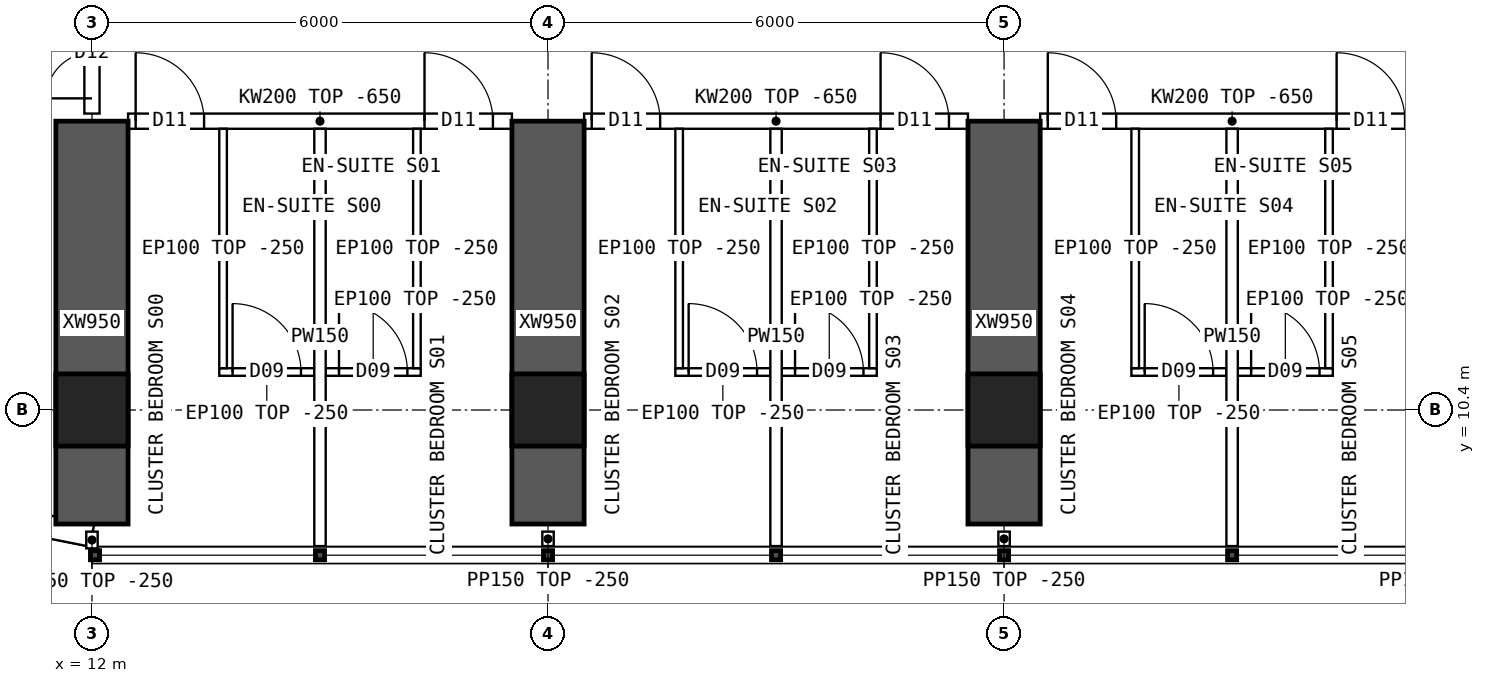
"""IFC4 building model, lengths in metres.
Left out: names, types, materials, properties, quantities, classifications, styles, units other than length and angle.
Written with IfcOpenShell. Run it as: python <this file> out.ifc"""

import sys

from ifc_helpers import new_model, si_unit, direction, frame, frame_2d, origin, origin_2d, place, context, subcontext, project, spatial, polyline, rectangle, hollow_rectangle, outline, extrude, element, fill, save


model = new_model("IFC4")
c1 = context("Model", 3, precision=1e-05, world=origin(), true_north=direction((0.0, 1.0)))
c2 = subcontext(c1, "Body", "Model", "MODEL_VIEW")
j1 = project(units=[si_unit("LENGTHUNIT", "METRE"), si_unit("PLANEANGLEUNIT", "RADIAN")], contexts=[c1])
p1 = place(None, origin())
s1 = spatial("IfcSite", under=j1, at=p1, CompositionType="ELEMENT")
p2 = place(p1, origin())
s2 = spatial("IfcBuilding", under=s1, at=p2, CompositionType="ELEMENT")
p3 = place(p2, frame((0.0, 0.0, 118.15)))
s3 = spatial("IfcBuildingStorey", under=s2, at=p3, CompositionType="ELEMENT", Elevation=118.15)
for number, where, z_axis, x_axis in (
    (1, (12.0, 10.4, 0.0), (0.0, 0.0, 1.0), (1.0, 0.0, 0.0)),
    (2, (18.0, 10.4, 0.0), (0.0, 0.0, 1.0), (1.0, 0.0, 0.0)),
    (3, (24.0, 10.4, 0.0), (0.0, 0.0, 1.0), (1.0, 0.0, 0.0)),
):
    element("IfcColumn", number, at=place(p3, frame(where, z_axis=z_axis, x_axis=x_axis)), inside=s3, PredefinedType="COLUMN", context=c2, shape_type="SweptSolid", body=[
        extrude(hollow_rectangle(XDim=0.95, YDim=0.95, WallThickness=0.095, at=origin_2d()), origin(), (0.0, 0.0, 1.0), 3.75),
    ])
for number, where, z_axis, x_axis in (
    (4, (12.0, 8.9, 0.0), (0.0, 0.0, 1.0), (0.0, 1.0, 0.0)),
    (5, (18.0, 8.9, 0.0), (0.0, 0.0, 1.0), (0.0, 1.0, 0.0)),
    (6, (24.0, 8.9, 0.0), (0.0, 0.0, 1.0), (0.0, 1.0, 0.0)),
):
    element("IfcWall", number, at=place(p3, frame(where, z_axis=z_axis, x_axis=x_axis)), inside=s3, PredefinedType="SHEAR", context=c2, shape_type="SweptSolid", body=[
        extrude(rectangle(XDim=5.3, YDim=0.95, at=frame_2d((2.65, 0.0))), origin(), (0.0, 0.0, 1.0), 3.75),
    ])
p4 = place(p3, frame((8.843, 9.378, 0.0), z_axis=(0.0, 0.0, 1.0), x_axis=(0.980787251524, -0.195080412259, 0.0)))
e7 = element("IfcWall", 7, at=p4, inside=s3, PredefinedType="SOLIDWALL", context=c2, shape_type="SweptSolid", body=[
    extrude(outline(polyline([(-0.03, -0.15), (3.249, -0.15), (3.189, 0.15), (0.03, 0.15), (-0.03, -0.15)])), origin(), (0.0, 0.0, 1.0), 3.5),
])
p5 = place(p4, frame((0.909, 0.0, 0.9)))
e8 = element("IfcOpeningElement", 8, at=p5, cuts=e7, PredefinedType="OPENING", context=c2, shape_type="SweptSolid", body=[
    extrude(rectangle(XDim=1.4, YDim=1.8, at=frame_2d((0.7, 0.9))), frame((0.0, 0.16, 0.0), z_axis=(0.0, -1.0, 0.0), x_axis=(1.0, 0.0, 0.0)), (0.0, 0.0, 1.0), 0.32),
])
p6 = place(p3, frame((12.475, 14.2, 0.0), z_axis=(0.0, 0.0, 1.0), x_axis=(1.0, 0.0, 0.0)))
e9 = element("IfcWall", 9, at=p6, inside=s3, PredefinedType="SOLIDWALL", context=c2, shape_type="SweptSolid", body=[
    extrude(outline(polyline([(0.0, 0.0), (5.05, 0.0), (5.05, 3.1), (0.0, 3.1), (0.0, 0.0)])), frame((0.0, 0.1, 0.0), z_axis=(0.0, -1.0, 0.0), x_axis=(1.0, 0.0, 0.0)), (0.0, 0.0, 1.0), 0.2),
])
p7 = place(p6, frame((0.1, 0.0, 0.0)))
e10 = element("IfcOpeningElement", 10, at=p7, cuts=e9, PredefinedType="OPENING", context=c2, shape_type="SweptSolid", body=[
    extrude(rectangle(XDim=0.9, YDim=2.1, at=frame_2d((0.45, 1.05))), frame((0.0, 0.11, 0.0), z_axis=(0.0, -1.0, 0.0), x_axis=(1.0, 0.0, 0.0)), (0.0, 0.0, 1.0), 0.22),
])
p8 = place(p6, frame((3.9, 0.0, 0.0)))
e11 = element("IfcOpeningElement", 11, at=p8, cuts=e9, PredefinedType="OPENING", context=c2, shape_type="SweptSolid", body=[
    extrude(rectangle(XDim=0.9, YDim=2.1, at=frame_2d((0.45, 1.05))), frame((0.0, 0.11, 0.0), z_axis=(0.0, -1.0, 0.0), x_axis=(1.0, 0.0, 0.0)), (0.0, 0.0, 1.0), 0.22),
])
p9 = place(p3, frame((18.475, 14.2, 0.0), z_axis=(0.0, 0.0, 1.0), x_axis=(1.0, 0.0, 0.0)))
e12 = element("IfcWall", 12, at=p9, inside=s3, PredefinedType="SOLIDWALL", context=c2, shape_type="SweptSolid", body=[
    extrude(outline(polyline([(0.0, 0.0), (5.05, 0.0), (5.05, 3.1), (0.0, 3.1), (0.0, 0.0)])), frame((0.0, 0.1, 0.0), z_axis=(0.0, -1.0, 0.0), x_axis=(1.0, 0.0, 0.0)), (0.0, 0.0, 1.0), 0.2),
])
p10 = place(p9, frame((0.1, 0.0, 0.0)))
e13 = element("IfcOpeningElement", 13, at=p10, cuts=e12, PredefinedType="OPENING", context=c2, shape_type="SweptSolid", body=[
    extrude(rectangle(XDim=0.9, YDim=2.1, at=frame_2d((0.45, 1.05))), frame((0.0, 0.11, 0.0), z_axis=(0.0, -1.0, 0.0), x_axis=(1.0, 0.0, 0.0)), (0.0, 0.0, 1.0), 0.22),
])
p11 = place(p9, frame((3.9, 0.0, 0.0)))
e14 = element("IfcOpeningElement", 14, at=p11, cuts=e12, PredefinedType="OPENING", context=c2, shape_type="SweptSolid", body=[
    extrude(rectangle(XDim=0.9, YDim=2.1, at=frame_2d((0.45, 1.05))), frame((0.0, 0.11, 0.0), z_axis=(0.0, -1.0, 0.0), x_axis=(1.0, 0.0, 0.0)), (0.0, 0.0, 1.0), 0.22),
])
p12 = place(p3, frame((24.475, 14.2, 0.0), z_axis=(0.0, 0.0, 1.0), x_axis=(1.0, 0.0, 0.0)))
e15 = element("IfcWall", 15, at=p12, inside=s3, PredefinedType="SOLIDWALL", context=c2, shape_type="SweptSolid", body=[
    extrude(outline(polyline([(0.0, 0.0), (5.05, 0.0), (5.05, 3.1), (0.0, 3.1), (0.0, 0.0)])), frame((0.0, 0.1, 0.0), z_axis=(0.0, -1.0, 0.0), x_axis=(1.0, 0.0, 0.0)), (0.0, 0.0, 1.0), 0.2),
])
p13 = place(p12, frame((0.1, 0.0, 0.0)))
e16 = element("IfcOpeningElement", 16, at=p13, cuts=e15, PredefinedType="OPENING", context=c2, shape_type="SweptSolid", body=[
    extrude(rectangle(XDim=0.9, YDim=2.1, at=frame_2d((0.45, 1.05))), frame((0.0, 0.11, 0.0), z_axis=(0.0, -1.0, 0.0), x_axis=(1.0, 0.0, 0.0)), (0.0, 0.0, 1.0), 0.22),
])
p14 = place(p12, frame((3.9, 0.0, 0.0)))
e17 = element("IfcOpeningElement", 17, at=p14, cuts=e15, PredefinedType="OPENING", context=c2, shape_type="SweptSolid", body=[
    extrude(rectangle(XDim=0.9, YDim=2.1, at=frame_2d((0.45, 1.05))), frame((0.0, 0.11, 0.0), z_axis=(0.0, -1.0, 0.0), x_axis=(1.0, 0.0, 0.0)), (0.0, 0.0, 1.0), 0.22),
])
p15 = place(p3, frame((15.0, 8.61, 0.0), z_axis=(0.0, 0.0, 1.0), x_axis=(0.0, 1.0, 0.0)))
e18 = element("IfcWall", 18, at=p15, inside=s3, PredefinedType="PARTITIONING", context=c2, shape_type="SweptSolid", body=[
    extrude(outline(polyline([(0.0, 0.0), (5.49, 0.0), (5.49, 3.1), (5.442, 3.1), (5.44, 3.5), (1.992, 3.5), (1.99, 3.1), (1.592, 3.1), (1.59, 3.5), (0.0, 3.5), (0.0, 0.0)])), frame((0.0, 0.075, 0.0), z_axis=(0.0, -1.0, 0.0), x_axis=(1.0, 0.0, 0.0)), (0.0, 0.0, 1.0), 0.15),
])
p16 = place(p3, frame((14.925, 10.9, 0.0), z_axis=(0.0, 0.0, 1.0), x_axis=(-1.0, 0.0, 0.0)))
e19 = element("IfcWall", 19, at=p16, inside=s3, PredefinedType="PARTITIONING", context=c2, shape_type="SweptSolid", body=[
    extrude(rectangle(XDim=1.25, YDim=0.1, at=frame_2d((0.625, 0.0))), origin(), (0.0, 0.0, 1.0), 3.5),
])
p17 = place(p16, frame((0.175, 0.0, 0.0)))
e20 = element("IfcOpeningElement", 20, at=p17, cuts=e19, PredefinedType="OPENING", context=c2, shape_type="SweptSolid", body=[
    extrude(rectangle(XDim=0.9, YDim=2.1, at=frame_2d((0.45, 1.05))), frame((0.0, 0.06, 0.0), z_axis=(0.0, -1.0, 0.0), x_axis=(1.0, 0.0, 0.0)), (0.0, 0.0, 1.0), 0.12),
])
p18 = place(p3, frame((13.725, 10.95, 0.0), z_axis=(0.0, 0.0, 1.0), x_axis=(0.0, 1.0, 0.0)))
e21 = element("IfcWall", 21, at=p18, inside=s3, PredefinedType="PARTITIONING", context=c2, shape_type="SweptSolid", body=[
    extrude(outline(polyline([(0.0, 0.0), (3.15, 0.0), (3.15, 3.1), (3.102, 3.1), (3.1, 3.5), (0.0, 3.5), (0.0, 0.0)])), frame((0.0, 0.05, 0.0), z_axis=(0.0, -1.0, 0.0), x_axis=(1.0, 0.0, 0.0)), (0.0, 0.0, 1.0), 0.1),
])
p19 = place(p3, frame((16.325, 10.9, 0.0), z_axis=(0.0, 0.0, 1.0), x_axis=(-1.0, 0.0, 0.0)))
e22 = element("IfcWall", 22, at=p19, inside=s3, PredefinedType="PARTITIONING", context=c2, shape_type="SweptSolid", body=[
    extrude(rectangle(XDim=1.25, YDim=0.1, at=frame_2d((0.625, 0.0))), origin(), (0.0, 0.0, 1.0), 3.5),
])
p20 = place(p19, frame((0.175, 0.0, 0.0)))
e23 = element("IfcOpeningElement", 23, at=p20, cuts=e22, PredefinedType="OPENING", context=c2, shape_type="SweptSolid", body=[
    extrude(rectangle(XDim=0.9, YDim=2.1, at=frame_2d((0.45, 1.05))), frame((0.0, 0.06, 0.0), z_axis=(0.0, -1.0, 0.0), x_axis=(1.0, 0.0, 0.0)), (0.0, 0.0, 1.0), 0.12),
])
p21 = place(p3, frame((16.275, 10.95, 0.0), z_axis=(0.0, 0.0, 1.0), x_axis=(0.0, 1.0, 0.0)))
e24 = element("IfcWall", 24, at=p21, inside=s3, PredefinedType="PARTITIONING", context=c2, shape_type="SweptSolid", body=[
    extrude(outline(polyline([(0.0, 0.0), (3.15, 0.0), (3.15, 3.1), (3.102, 3.1), (3.1, 3.5), (0.0, 3.5), (0.0, 0.0)])), frame((0.0, 0.05, 0.0), z_axis=(0.0, -1.0, 0.0), x_axis=(1.0, 0.0, 0.0)), (0.0, 0.0, 1.0), 0.1),
])
p22 = place(p3, frame((21.0, 8.61, 0.0), z_axis=(0.0, 0.0, 1.0), x_axis=(0.0, 1.0, 0.0)))
e25 = element("IfcWall", 25, at=p22, inside=s3, PredefinedType="PARTITIONING", context=c2, shape_type="SweptSolid", body=[
    extrude(outline(polyline([(0.0, 0.0), (5.49, 0.0), (5.49, 3.1), (5.442, 3.1), (5.44, 3.5), (1.992, 3.5), (1.99, 3.1), (1.592, 3.1), (1.59, 3.5), (0.0, 3.5), (0.0, 0.0)])), frame((0.0, 0.075, 0.0), z_axis=(0.0, -1.0, 0.0), x_axis=(1.0, 0.0, 0.0)), (0.0, 0.0, 1.0), 0.15),
])
p23 = place(p3, frame((20.925, 10.9, 0.0), z_axis=(0.0, 0.0, 1.0), x_axis=(-1.0, 0.0, 0.0)))
e26 = element("IfcWall", 26, at=p23, inside=s3, PredefinedType="PARTITIONING", context=c2, shape_type="SweptSolid", body=[
    extrude(rectangle(XDim=1.25, YDim=0.1, at=frame_2d((0.625, 0.0))), origin(), (0.0, 0.0, 1.0), 3.5),
])
p24 = place(p23, frame((0.175, 0.0, 0.0)))
e27 = element("IfcOpeningElement", 27, at=p24, cuts=e26, PredefinedType="OPENING", context=c2, shape_type="SweptSolid", body=[
    extrude(rectangle(XDim=0.9, YDim=2.1, at=frame_2d((0.45, 1.05))), frame((0.0, 0.06, 0.0), z_axis=(0.0, -1.0, 0.0), x_axis=(1.0, 0.0, 0.0)), (0.0, 0.0, 1.0), 0.12),
])
p25 = place(p3, frame((19.725, 10.95, 0.0), z_axis=(0.0, 0.0, 1.0), x_axis=(0.0, 1.0, 0.0)))
e28 = element("IfcWall", 28, at=p25, inside=s3, PredefinedType="PARTITIONING", context=c2, shape_type="SweptSolid", body=[
    extrude(outline(polyline([(0.0, 0.0), (3.15, 0.0), (3.15, 3.1), (3.102, 3.1), (3.1, 3.5), (0.0, 3.5), (0.0, 0.0)])), frame((0.0, 0.05, 0.0), z_axis=(0.0, -1.0, 0.0), x_axis=(1.0, 0.0, 0.0)), (0.0, 0.0, 1.0), 0.1),
])
p26 = place(p3, frame((22.325, 10.9, 0.0), z_axis=(0.0, 0.0, 1.0), x_axis=(-1.0, 0.0, 0.0)))
e29 = element("IfcWall", 29, at=p26, inside=s3, PredefinedType="PARTITIONING", context=c2, shape_type="SweptSolid", body=[
    extrude(rectangle(XDim=1.25, YDim=0.1, at=frame_2d((0.625, 0.0))), origin(), (0.0, 0.0, 1.0), 3.5),
])
p27 = place(p26, frame((0.175, 0.0, 0.0)))
e30 = element("IfcOpeningElement", 30, at=p27, cuts=e29, PredefinedType="OPENING", context=c2, shape_type="SweptSolid", body=[
    extrude(rectangle(XDim=0.9, YDim=2.1, at=frame_2d((0.45, 1.05))), frame((0.0, 0.06, 0.0), z_axis=(0.0, -1.0, 0.0), x_axis=(1.0, 0.0, 0.0)), (0.0, 0.0, 1.0), 0.12),
])
p28 = place(p3, frame((22.275, 10.95, 0.0), z_axis=(0.0, 0.0, 1.0), x_axis=(0.0, 1.0, 0.0)))
e31 = element("IfcWall", 31, at=p28, inside=s3, PredefinedType="PARTITIONING", context=c2, shape_type="SweptSolid", body=[
    extrude(outline(polyline([(0.0, 0.0), (3.15, 0.0), (3.15, 3.1), (3.102, 3.1), (3.1, 3.5), (0.0, 3.5), (0.0, 0.0)])), frame((0.0, 0.05, 0.0), z_axis=(0.0, -1.0, 0.0), x_axis=(1.0, 0.0, 0.0)), (0.0, 0.0, 1.0), 0.1),
])
p29 = place(p3, frame((27.0, 8.61, 0.0), z_axis=(0.0, 0.0, 1.0), x_axis=(0.0, 1.0, 0.0)))
e32 = element("IfcWall", 32, at=p29, inside=s3, PredefinedType="PARTITIONING", context=c2, shape_type="SweptSolid", body=[
    extrude(outline(polyline([(0.0, 0.0), (5.49, 0.0), (5.49, 3.1), (5.442, 3.1), (5.44, 3.5), (1.992, 3.5), (1.99, 3.1), (1.592, 3.1), (1.59, 3.5), (0.0, 3.5), (0.0, 0.0)])), frame((0.0, 0.075, 0.0), z_axis=(0.0, -1.0, 0.0), x_axis=(1.0, 0.0, 0.0)), (0.0, 0.0, 1.0), 0.15),
])
p30 = place(p3, frame((26.925, 10.9, 0.0), z_axis=(0.0, 0.0, 1.0), x_axis=(-1.0, 0.0, 0.0)))
e33 = element("IfcWall", 33, at=p30, inside=s3, PredefinedType="PARTITIONING", context=c2, shape_type="SweptSolid", body=[
    extrude(rectangle(XDim=1.25, YDim=0.1, at=frame_2d((0.625, 0.0))), origin(), (0.0, 0.0, 1.0), 3.5),
])
p31 = place(p30, frame((0.175, 0.0, 0.0)))
e34 = element("IfcOpeningElement", 34, at=p31, cuts=e33, PredefinedType="OPENING", context=c2, shape_type="SweptSolid", body=[
    extrude(rectangle(XDim=0.9, YDim=2.1, at=frame_2d((0.45, 1.05))), frame((0.0, 0.06, 0.0), z_axis=(0.0, -1.0, 0.0), x_axis=(1.0, 0.0, 0.0)), (0.0, 0.0, 1.0), 0.12),
])
p32 = place(p3, frame((25.725, 10.95, 0.0), z_axis=(0.0, 0.0, 1.0), x_axis=(0.0, 1.0, 0.0)))
e35 = element("IfcWall", 35, at=p32, inside=s3, PredefinedType="PARTITIONING", context=c2, shape_type="SweptSolid", body=[
    extrude(outline(polyline([(0.0, 0.0), (3.15, 0.0), (3.15, 3.1), (3.102, 3.1), (3.1, 3.5), (0.0, 3.5), (0.0, 0.0)])), frame((0.0, 0.05, 0.0), z_axis=(0.0, -1.0, 0.0), x_axis=(1.0, 0.0, 0.0)), (0.0, 0.0, 1.0), 0.1),
])
p33 = place(p3, frame((28.325, 10.9, 0.0), z_axis=(0.0, 0.0, 1.0), x_axis=(-1.0, 0.0, 0.0)))
e36 = element("IfcWall", 36, at=p33, inside=s3, PredefinedType="PARTITIONING", context=c2, shape_type="SweptSolid", body=[
    extrude(rectangle(XDim=1.25, YDim=0.1, at=frame_2d((0.625, 0.0))), origin(), (0.0, 0.0, 1.0), 3.5),
])
p34 = place(p33, frame((0.175, 0.0, 0.0)))
e37 = element("IfcOpeningElement", 37, at=p34, cuts=e36, PredefinedType="OPENING", context=c2, shape_type="SweptSolid", body=[
    extrude(rectangle(XDim=0.9, YDim=2.1, at=frame_2d((0.45, 1.05))), frame((0.0, 0.06, 0.0), z_axis=(0.0, -1.0, 0.0), x_axis=(1.0, 0.0, 0.0)), (0.0, 0.0, 1.0), 0.12),
])
p35 = place(p3, frame((28.275, 10.95, 0.0), z_axis=(0.0, 0.0, 1.0), x_axis=(0.0, 1.0, 0.0)))
e38 = element("IfcWall", 38, at=p35, inside=s3, PredefinedType="PARTITIONING", context=c2, shape_type="SweptSolid", body=[
    extrude(outline(polyline([(0.0, 0.0), (3.15, 0.0), (3.15, 3.1), (3.102, 3.1), (3.1, 3.5), (0.0, 3.5), (0.0, 0.0)])), frame((0.0, 0.05, 0.0), z_axis=(0.0, -1.0, 0.0), x_axis=(1.0, 0.0, 0.0)), (0.0, 0.0, 1.0), 0.1),
])
p36 = place(p3, frame((12.0, 14.3, 0.0), z_axis=(0.0, 0.0, 1.0), x_axis=(0.0, 1.0, 0.0)))
e39 = element("IfcWall", 39, at=p36, inside=s3, PredefinedType="SOLIDWALL", context=c2, shape_type="SweptSolid", body=[
    extrude(outline(polyline([(0.0, 0.0), (1.6, 0.0), (1.6, 3.1), (0.0, 3.1), (0.0, 0.0)])), frame((0.0, 0.1, 0.0), z_axis=(0.0, -1.0, 0.0), x_axis=(1.0, 0.0, 0.0)), (0.0, 0.0, 1.0), 0.2),
])
p37 = place(p36, frame((0.2, 0.0, 0.0)))
e40 = element("IfcOpeningElement", 40, at=p37, cuts=e39, PredefinedType="OPENING", context=c2, shape_type="SweptSolid", body=[
    extrude(rectangle(XDim=1.2, YDim=2.1, at=frame_2d((0.6, 1.05))), frame((0.0, 0.11, 0.0), z_axis=(0.0, -1.0, 0.0), x_axis=(1.0, 0.0, 0.0)), (0.0, 0.0, 1.0), 0.22),
])
p38 = place(p3, frame((12.0, 8.8, 0.0), z_axis=(0.0, 0.0, 1.0), x_axis=(0.0, -1.0, 0.0)))
e41 = element("IfcWall", 41, at=p38, inside=s3, PredefinedType="PARTITIONING", context=c2, shape_type="SweptSolid", body=[
    extrude(rectangle(XDim=0.22, YDim=0.15, at=frame_2d((0.11, 0.0))), origin(), (0.0, 0.0, 1.0), 3.5),
])
for number, where, z_axis, x_axis in (
    (42, (18.0, 8.8, 0.0), (0.0, 0.0, 1.0), (0.0, -1.0, 0.0)),
    (43, (24.0, 8.8, 0.0), (0.0, 0.0, 1.0), (0.0, -1.0, 0.0)),
):
    element("IfcWall", number, at=place(p3, frame(where, z_axis=z_axis, x_axis=x_axis)), inside=s3, PredefinedType="PARTITIONING", context=c2, shape_type="SweptSolid", body=[
        extrude(rectangle(XDim=0.19, YDim=0.15, at=frame_2d((0.095, 0.0))), origin(), (0.0, 0.0, 1.0), 3.5),
    ])
p39 = place(p17, origin())
e44 = element("IfcDoor", 44, at=p39, inside=s3, OperationType="SINGLE_SWING_RIGHT", PredefinedType="DOOR", context=c2, shape_type="SweptSolid", body=[
    extrude(rectangle(XDim=0.9, YDim=2.1, at=frame_2d((0.45, 1.05))), frame((0.0, 0.025, 0.0), z_axis=(0.0, -1.0, 0.0), x_axis=(1.0, 0.0, 0.0)), (0.0, 0.0, 1.0), 0.05),
])
fill(e20, e44)
p40 = place(p7, origin())
e45 = element("IfcDoor", 45, at=p40, inside=s3, OperationType="SINGLE_SWING_LEFT", PredefinedType="DOOR", context=c2, shape_type="SweptSolid", body=[
    extrude(rectangle(XDim=0.9, YDim=2.1, at=frame_2d((0.45, 1.05))), frame((0.0, 0.025, 0.0), z_axis=(0.0, -1.0, 0.0), x_axis=(1.0, 0.0, 0.0)), (0.0, 0.0, 1.0), 0.05),
])
fill(e10, e45)
p41 = place(p20, origin())
e46 = element("IfcDoor", 46, at=p41, inside=s3, OperationType="SINGLE_SWING_RIGHT", PredefinedType="DOOR", context=c2, shape_type="SweptSolid", body=[
    extrude(rectangle(XDim=0.9, YDim=2.1, at=frame_2d((0.45, 1.05))), frame((0.0, 0.025, 0.0), z_axis=(0.0, -1.0, 0.0), x_axis=(1.0, 0.0, 0.0)), (0.0, 0.0, 1.0), 0.05),
])
fill(e23, e46)
p42 = place(p8, origin())
e47 = element("IfcDoor", 47, at=p42, inside=s3, OperationType="SINGLE_SWING_LEFT", PredefinedType="DOOR", context=c2, shape_type="SweptSolid", body=[
    extrude(rectangle(XDim=0.9, YDim=2.1, at=frame_2d((0.45, 1.05))), frame((0.0, 0.025, 0.0), z_axis=(0.0, -1.0, 0.0), x_axis=(1.0, 0.0, 0.0)), (0.0, 0.0, 1.0), 0.05),
])
fill(e11, e47)
p43 = place(p24, origin())
e48 = element("IfcDoor", 48, at=p43, inside=s3, OperationType="SINGLE_SWING_RIGHT", PredefinedType="DOOR", context=c2, shape_type="SweptSolid", body=[
    extrude(rectangle(XDim=0.9, YDim=2.1, at=frame_2d((0.45, 1.05))), frame((0.0, 0.025, 0.0), z_axis=(0.0, -1.0, 0.0), x_axis=(1.0, 0.0, 0.0)), (0.0, 0.0, 1.0), 0.05),
])
fill(e27, e48)
p44 = place(p10, origin())
e49 = element("IfcDoor", 49, at=p44, inside=s3, OperationType="SINGLE_SWING_LEFT", PredefinedType="DOOR", context=c2, shape_type="SweptSolid", body=[
    extrude(rectangle(XDim=0.9, YDim=2.1, at=frame_2d((0.45, 1.05))), frame((0.0, 0.025, 0.0), z_axis=(0.0, -1.0, 0.0), x_axis=(1.0, 0.0, 0.0)), (0.0, 0.0, 1.0), 0.05),
])
fill(e13, e49)
p45 = place(p27, origin())
e50 = element("IfcDoor", 50, at=p45, inside=s3, OperationType="SINGLE_SWING_RIGHT", PredefinedType="DOOR", context=c2, shape_type="SweptSolid", body=[
    extrude(rectangle(XDim=0.9, YDim=2.1, at=frame_2d((0.45, 1.05))), frame((0.0, 0.025, 0.0), z_axis=(0.0, -1.0, 0.0), x_axis=(1.0, 0.0, 0.0)), (0.0, 0.0, 1.0), 0.05),
])
fill(e30, e50)
p46 = place(p11, origin())
e51 = element("IfcDoor", 51, at=p46, inside=s3, OperationType="SINGLE_SWING_LEFT", PredefinedType="DOOR", context=c2, shape_type="SweptSolid", body=[
    extrude(rectangle(XDim=0.9, YDim=2.1, at=frame_2d((0.45, 1.05))), frame((0.0, 0.025, 0.0), z_axis=(0.0, -1.0, 0.0), x_axis=(1.0, 0.0, 0.0)), (0.0, 0.0, 1.0), 0.05),
])
fill(e14, e51)
p47 = place(p31, origin())
e52 = element("IfcDoor", 52, at=p47, inside=s3, OperationType="SINGLE_SWING_RIGHT", PredefinedType="DOOR", context=c2, shape_type="SweptSolid", body=[
    extrude(rectangle(XDim=0.9, YDim=2.1, at=frame_2d((0.45, 1.05))), frame((0.0, 0.025, 0.0), z_axis=(0.0, -1.0, 0.0), x_axis=(1.0, 0.0, 0.0)), (0.0, 0.0, 1.0), 0.05),
])
fill(e34, e52)
p48 = place(p13, origin())
e53 = element("IfcDoor", 53, at=p48, inside=s3, OperationType="SINGLE_SWING_LEFT", PredefinedType="DOOR", context=c2, shape_type="SweptSolid", body=[
    extrude(rectangle(XDim=0.9, YDim=2.1, at=frame_2d((0.45, 1.05))), frame((0.0, 0.025, 0.0), z_axis=(0.0, -1.0, 0.0), x_axis=(1.0, 0.0, 0.0)), (0.0, 0.0, 1.0), 0.05),
])
fill(e16, e53)
p49 = place(p34, origin())
e54 = element("IfcDoor", 54, at=p49, inside=s3, OperationType="SINGLE_SWING_RIGHT", PredefinedType="DOOR", context=c2, shape_type="SweptSolid", body=[
    extrude(rectangle(XDim=0.9, YDim=2.1, at=frame_2d((0.45, 1.05))), frame((0.0, 0.025, 0.0), z_axis=(0.0, -1.0, 0.0), x_axis=(1.0, 0.0, 0.0)), (0.0, 0.0, 1.0), 0.05),
])
fill(e37, e54)
p50 = place(p14, origin())
e55 = element("IfcDoor", 55, at=p50, inside=s3, OperationType="SINGLE_SWING_LEFT", PredefinedType="DOOR", context=c2, shape_type="SweptSolid", body=[
    extrude(rectangle(XDim=0.9, YDim=2.1, at=frame_2d((0.45, 1.05))), frame((0.0, 0.025, 0.0), z_axis=(0.0, -1.0, 0.0), x_axis=(1.0, 0.0, 0.0)), (0.0, 0.0, 1.0), 0.05),
])
fill(e17, e55)
p51 = place(p37, origin())
e56 = element("IfcDoor", 56, at=p51, inside=s3, OperationType="DOUBLE_DOOR_SINGLE_SWING", PredefinedType="DOOR", context=c2, shape_type="SweptSolid", body=[
    extrude(rectangle(XDim=1.2, YDim=2.1, at=frame_2d((0.6, 1.05))), frame((0.0, 0.025, 0.0), z_axis=(0.0, -1.0, 0.0), x_axis=(1.0, 0.0, 0.0)), (0.0, 0.0, 1.0), 0.05),
])
fill(e40, e56)
save(model, sys.argv[1])
